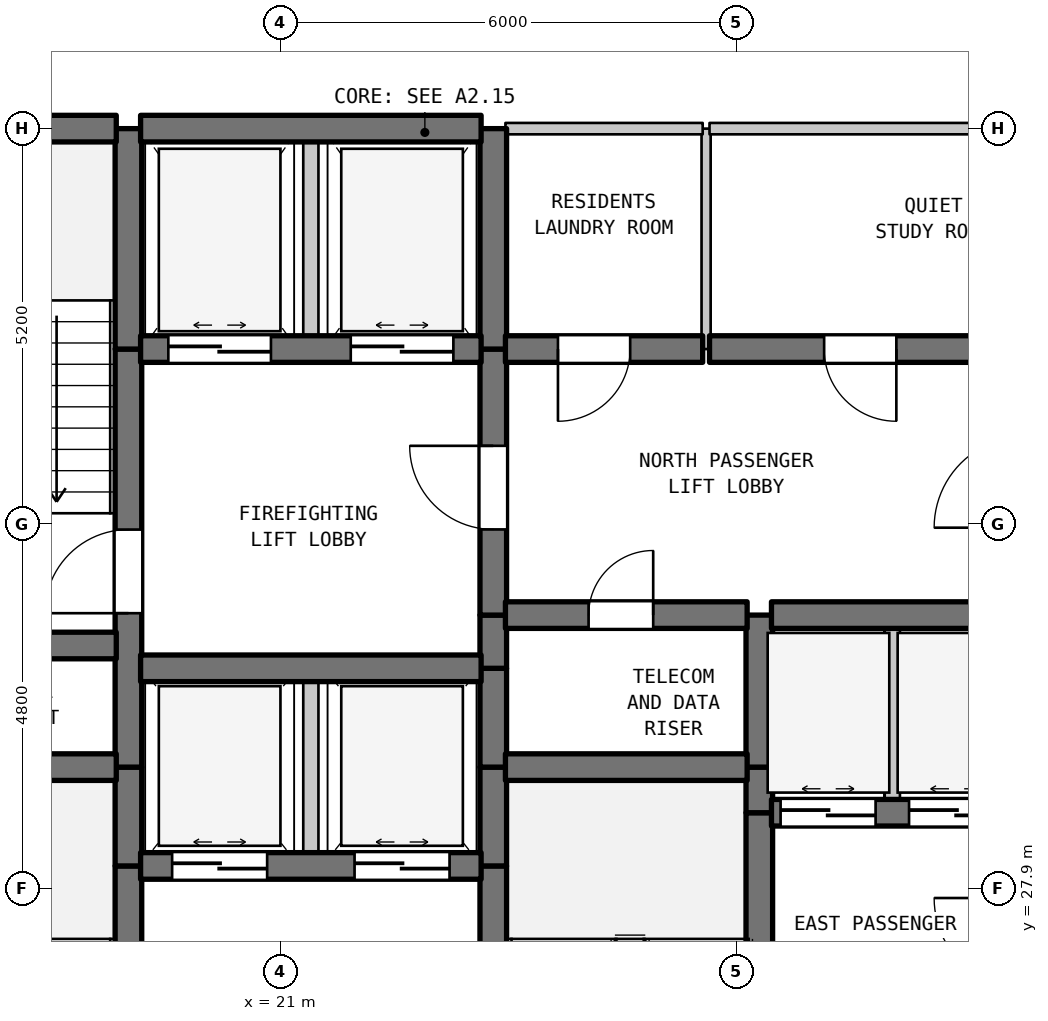
"""IFC4 building model, lengths in metres.
Left out: names, types, materials, properties, quantities, classifications, styles, units other than length and angle.
Written with IfcOpenShell. Run it as: python <this file> out.ifc"""

import sys

from ifc_helpers import new_model, si_unit, direction, frame, frame_2d, origin, place, context, subcontext, project, spatial, rectangle, extrude, element, fill, save


model = new_model("IFC4")
c1 = context("Model", 3, precision=1e-05, world=origin(), true_north=direction((0.0, 1.0)))
c2 = subcontext(c1, "Body", "Model", "MODEL_VIEW")
j1 = project(units=[si_unit("LENGTHUNIT", "METRE"), si_unit("PLANEANGLEUNIT", "RADIAN")], contexts=[c1])
p1 = place(None, origin())
s1 = spatial("IfcSite", under=j1, at=p1, CompositionType="ELEMENT")
p2 = place(p1, origin())
s2 = spatial("IfcBuilding", under=s1, at=p2, CompositionType="ELEMENT")
p3 = place(p2, frame((0.0, 0.0, 206.9)))
s3 = spatial("IfcBuildingStorey", under=s2, at=p3, CompositionType="ELEMENT", Elevation=206.9)
p4 = place(p3, frame((19.0, 22.7, 0.0), z_axis=(0.0, 0.0, 1.0), x_axis=(0.0, 1.0, 0.0)))
e1 = element("IfcWall", 1, at=p4, inside=s3, PredefinedType="SHEAR", context=c2, shape_type="SweptSolid", body=[
    extrude(rectangle(XDim=5.5, YDim=0.35, at=frame_2d((2.75, 0.0))), origin(), (0.0, 0.0, 1.0), 3.39),
])
p5 = place(p4, frame((0.631, 0.0, 0.0)))
e2 = element("IfcOpeningElement", 2, at=p5, cuts=e1, PredefinedType="OPENING", context=c2, shape_type="SweptSolid", body=[
    extrude(rectangle(XDim=1.1, YDim=2.15, at=frame_2d((0.55, 1.075))), frame((0.0, 0.185, 0.0), z_axis=(0.0, -1.0, 0.0), x_axis=(1.0, 0.0, 0.0)), (0.0, 0.0, 1.0), 0.37),
])
p6 = place(p3, frame((19.0, 28.2, 0.0), z_axis=(0.0, 0.0, 1.0), x_axis=(0.0, 1.0, 0.0)))
e3 = element("IfcWall", 3, at=p6, inside=s3, PredefinedType="SHEAR", context=c2, shape_type="SweptSolid", body=[
    extrude(rectangle(XDim=1.3, YDim=0.35, at=frame_2d((0.65, 0.0))), origin(), (0.0, 0.0, 1.0), 3.39),
])
p7 = place(p3, frame((19.0, 29.5, 0.0), z_axis=(0.0, 0.0, 1.0), x_axis=(0.0, 1.0, 0.0)))
e4 = element("IfcWall", 4, at=p7, inside=s3, PredefinedType="SHEAR", context=c2, shape_type="SweptSolid", body=[
    extrude(rectangle(XDim=5.5, YDim=0.35, at=frame_2d((2.75, 0.0))), origin(), (0.0, 0.0, 1.0), 3.39),
])
p8 = place(p7, frame((2.025, 0.0, 0.0)))
e5 = element("IfcOpeningElement", 5, at=p8, cuts=e4, PredefinedType="OPENING", context=c2, shape_type="SweptSolid", body=[
    extrude(rectangle(XDim=1.1, YDim=2.15, at=frame_2d((0.55, 1.075))), frame((0.0, 0.185, 0.0), z_axis=(0.0, -1.0, 0.0), x_axis=(1.0, 0.0, 0.0)), (0.0, 0.0, 1.0), 0.37),
])
p9 = place(p3, frame((19.0, 35.0, 0.0), z_axis=(0.0, 0.0, 1.0), x_axis=(0.0, 1.0, 0.0)))
e6 = element("IfcWall", 6, at=p9, inside=s3, PredefinedType="SHEAR", context=c2, shape_type="SweptSolid", body=[
    extrude(rectangle(XDim=2.9, YDim=0.35, at=frame_2d((1.45, 0.0))), origin(), (0.0, 0.0, 1.0), 3.39),
])
p10 = place(p3, frame((21.4, 28.2, 0.0), z_axis=(0.0, 0.0, 1.0), x_axis=(0.0, 1.0, 0.0)))
e7 = element("IfcWall", 7, at=p10, inside=s3, PredefinedType="STANDARD", context=c2, shape_type="SweptSolid", body=[
    extrude(rectangle(XDim=2.6, YDim=0.2, at=frame_2d((1.3, 0.0))), origin(), (0.0, 0.0, 1.0), 3.39),
])
p11 = place(p3, frame((21.4, 35.0, 0.0), z_axis=(0.0, 0.0, 1.0), x_axis=(0.0, 1.0, 0.0)))
e8 = element("IfcWall", 8, at=p11, inside=s3, PredefinedType="STANDARD", context=c2, shape_type="SweptSolid", body=[
    extrude(rectangle(XDim=2.9, YDim=0.2, at=frame_2d((1.45, 0.0))), origin(), (0.0, 0.0, 1.0), 3.39),
])
p12 = place(p3, frame((23.8, 22.7, 0.0), z_axis=(0.0, 0.0, 1.0), x_axis=(0.0, 1.0, 0.0)))
e9 = element("IfcWall", 9, at=p12, inside=s3, PredefinedType="SHEAR", context=c2, shape_type="SweptSolid", body=[
    extrude(rectangle(XDim=5.5, YDim=0.35, at=frame_2d((2.75, 0.0))), origin(), (0.0, 0.0, 1.0), 3.39),
])
p13 = place(p12, frame((0.235, 0.0, 0.0)))
e10 = element("IfcOpeningElement", 10, at=p13, cuts=e9, PredefinedType="OPENING", context=c2, shape_type="SweptSolid", body=[
    extrude(rectangle(XDim=1.1, YDim=2.15, at=frame_2d((0.55, 1.075))), frame((0.0, 0.185, 0.0), z_axis=(0.0, -1.0, 0.0), x_axis=(1.0, 0.0, 0.0)), (0.0, 0.0, 1.0), 0.37),
])
for number, where, z_axis, x_axis in (
    (11, (23.8, 28.2, 0.0), (0.0, 0.0, 1.0), (0.0, 1.0, 0.0)),
    (12, (23.8, 29.5, 0.0), (0.0, 0.0, 1.0), (0.0, 1.0, 0.0)),
):
    element("IfcWall", number, at=place(p3, frame(where, z_axis=z_axis, x_axis=x_axis)), inside=s3, PredefinedType="SHEAR", context=c2, shape_type="SweptSolid", body=[
        extrude(rectangle(XDim=1.3, YDim=0.35, at=frame_2d((0.65, 0.0))), origin(), (0.0, 0.0, 1.0), 3.39),
    ])
p14 = place(p3, frame((23.8, 30.8, 0.0), z_axis=(0.0, 0.0, 1.0), x_axis=(0.0, 1.0, 0.0)))
e13 = element("IfcWall", 13, at=p14, inside=s3, PredefinedType="SHEAR", context=c2, shape_type="SweptSolid", body=[
    extrude(rectangle(XDim=0.7, YDim=0.35, at=frame_2d((0.35, 0.0))), origin(), (0.0, 0.0, 1.0), 3.39),
])
p15 = place(p3, frame((23.8, 31.5, 0.0), z_axis=(0.0, 0.0, 1.0), x_axis=(0.0, 1.0, 0.0)))
e14 = element("IfcWall", 14, at=p15, inside=s3, PredefinedType="SHEAR", context=c2, shape_type="SweptSolid", body=[
    extrude(rectangle(XDim=3.5, YDim=0.35, at=frame_2d((1.75, 0.0))), origin(), (0.0, 0.0, 1.0), 3.39),
])
p16 = place(p15, frame((1.127, 0.0, 0.0)))
e15 = element("IfcOpeningElement", 15, at=p16, cuts=e14, PredefinedType="OPENING", context=c2, shape_type="SweptSolid", body=[
    extrude(rectangle(XDim=1.1, YDim=2.15, at=frame_2d((0.55, 1.075))), frame((0.0, 0.185, 0.0), z_axis=(0.0, -1.0, 0.0), x_axis=(1.0, 0.0, 0.0)), (0.0, 0.0, 1.0), 0.37),
])
p17 = place(p3, frame((23.8, 35.0, 0.0), z_axis=(0.0, 0.0, 1.0), x_axis=(0.0, 1.0, 0.0)))
e16 = element("IfcWall", 16, at=p17, inside=s3, PredefinedType="SHEAR", context=c2, shape_type="SweptSolid", body=[
    extrude(rectangle(XDim=2.9, YDim=0.35, at=frame_2d((1.45, 0.0))), origin(), (0.0, 0.0, 1.0), 3.39),
])
p18 = place(p3, frame((26.6, 35.0, 0.0), z_axis=(0.0, 0.0, 1.0), x_axis=(0.0, 1.0, 0.0)))
e17 = element("IfcWall", 17, at=p18, inside=s3, PredefinedType="PARTITIONING", context=c2, shape_type="SweptSolid", body=[
    extrude(rectangle(XDim=2.9, YDim=0.12, at=frame_2d((1.45, 0.0))), origin(), (0.0, 0.0, 1.0), 3.39),
])
p19 = place(p3, frame((27.3, 25.6, 0.0), z_axis=(0.0, 0.0, 1.0), x_axis=(0.0, 1.0, 0.0)))
e18 = element("IfcWall", 18, at=p19, inside=s3, PredefinedType="SHEAR", context=c2, shape_type="SweptSolid", body=[
    extrude(rectangle(XDim=3.3, YDim=0.35, at=frame_2d((1.65, 0.0))), origin(), (0.0, 0.0, 1.0), 3.39),
])
p20 = place(p3, frame((27.3, 28.9, 0.0), z_axis=(0.0, 0.0, 1.0), x_axis=(0.0, 1.0, 0.0)))
e19 = element("IfcWall", 19, at=p20, inside=s3, PredefinedType="SHEAR", context=c2, shape_type="SweptSolid", body=[
    extrude(rectangle(XDim=0.6, YDim=0.35, at=frame_2d((0.3, 0.0))), origin(), (0.0, 0.0, 1.0), 3.39),
])
p21 = place(p3, frame((27.3, 29.5, 0.0), z_axis=(0.0, 0.0, 1.0), x_axis=(0.0, 1.0, 0.0)))
e20 = element("IfcWall", 20, at=p21, inside=s3, PredefinedType="SHEAR", context=c2, shape_type="SweptSolid", body=[
    extrude(rectangle(XDim=2.0, YDim=0.35, at=frame_2d((1.0, 0.0))), origin(), (0.0, 0.0, 1.0), 3.39),
])
p22 = place(p3, frame((29.05, 28.9, 0.0), z_axis=(0.0, 0.0, 1.0), x_axis=(0.0, 1.0, 0.0)))
e21 = element("IfcWall", 21, at=p22, inside=s3, PredefinedType="STANDARD", context=c2, shape_type="SweptSolid", body=[
    extrude(rectangle(XDim=2.6, YDim=0.2, at=frame_2d((1.3, 0.0))), origin(), (0.0, 0.0, 1.0), 3.39),
])
p23 = place(p3, frame((19.16, 28.2, 0.0), z_axis=(0.0, 0.0, 1.0), x_axis=(1.0, 0.0, 0.0)))
e22 = element("IfcWall", 22, at=p23, inside=s3, PredefinedType="SHEAR", context=c2, shape_type="SweptSolid", body=[
    extrude(rectangle(XDim=4.48, YDim=0.35, at=frame_2d((2.24, 0.0))), origin(), (0.0, 0.0, 1.0), 3.39),
])
p24 = place(p23, frame((0.415, 0.0, 0.0)))
e23 = element("IfcOpeningElement", 23, at=p24, cuts=e22, PredefinedType="OPENING", context=c2, shape_type="SweptSolid", body=[
    extrude(rectangle(XDim=1.25, YDim=2.2, at=frame_2d((0.625, 1.1))), frame((0.0, 0.185, 0.0), z_axis=(0.0, -1.0, 0.0), x_axis=(1.0, 0.0, 0.0)), (0.0, 0.0, 1.0), 0.37),
])
p25 = place(p23, frame((2.815, 0.0, 0.0)))
e24 = element("IfcOpeningElement", 24, at=p25, cuts=e22, PredefinedType="OPENING", context=c2, shape_type="SweptSolid", body=[
    extrude(rectangle(XDim=1.25, YDim=2.2, at=frame_2d((0.625, 1.1))), frame((0.0, 0.185, 0.0), z_axis=(0.0, -1.0, 0.0), x_axis=(1.0, 0.0, 0.0)), (0.0, 0.0, 1.0), 0.37),
])
p26 = place(p3, frame((27.46, 28.9, 0.0), z_axis=(0.0, 0.0, 1.0), x_axis=(1.0, 0.0, 0.0)))
e25 = element("IfcWall", 25, at=p26, inside=s3, PredefinedType="SHEAR", context=c2, shape_type="SweptSolid", body=[
    extrude(rectangle(XDim=3.18, YDim=0.35, at=frame_2d((1.59, 0.0))), origin(), (0.0, 0.0, 1.0), 3.39),
])
p27 = place(p26, frame((0.12, 0.0, 0.0)))
e26 = element("IfcOpeningElement", 26, at=p27, cuts=e25, PredefinedType="OPENING", context=c2, shape_type="SweptSolid", body=[
    extrude(rectangle(XDim=1.25, YDim=2.2, at=frame_2d((0.625, 1.1))), frame((0.0, 0.185, 0.0), z_axis=(0.0, -1.0, 0.0), x_axis=(1.0, 0.0, 0.0)), (0.0, 0.0, 1.0), 0.37),
])
p28 = place(p26, frame((1.81, 0.0, 0.0)))
e27 = element("IfcOpeningElement", 27, at=p28, cuts=e25, PredefinedType="OPENING", context=c2, shape_type="SweptSolid", body=[
    extrude(rectangle(XDim=1.25, YDim=2.2, at=frame_2d((0.625, 1.1))), frame((0.0, 0.185, 0.0), z_axis=(0.0, -1.0, 0.0), x_axis=(1.0, 0.0, 0.0)), (0.0, 0.0, 1.0), 0.37),
])
p29 = place(p3, frame((15.16, 29.5, 0.0), z_axis=(0.0, 0.0, 1.0), x_axis=(1.0, 0.0, 0.0)))
e28 = element("IfcWall", 28, at=p29, inside=s3, PredefinedType="SHEAR", context=c2, shape_type="SweptSolid", body=[
    extrude(rectangle(XDim=3.68, YDim=0.35, at=frame_2d((1.84, 0.0))), origin(), (0.0, 0.0, 1.0), 3.39),
])
p30 = place(p3, frame((23.96, 29.5, 0.0), z_axis=(0.0, 0.0, 1.0), x_axis=(1.0, 0.0, 0.0)))
e29 = element("IfcWall", 29, at=p30, inside=s3, PredefinedType="SHEAR", context=c2, shape_type="SweptSolid", body=[
    extrude(rectangle(XDim=3.18, YDim=0.35, at=frame_2d((1.59, 0.0))), origin(), (0.0, 0.0, 1.0), 3.39),
])
p31 = place(p3, frame((19.16, 30.8, 0.0), z_axis=(0.0, 0.0, 1.0), x_axis=(1.0, 0.0, 0.0)))
e30 = element("IfcWall", 30, at=p31, inside=s3, PredefinedType="SHEAR", context=c2, shape_type="SweptSolid", body=[
    extrude(rectangle(XDim=4.48, YDim=0.35, at=frame_2d((2.24, 0.0))), origin(), (0.0, 0.0, 1.0), 3.39),
])
p32 = place(p3, frame((15.16, 31.1, 0.0), z_axis=(0.0, 0.0, 1.0), x_axis=(1.0, 0.0, 0.0)))
e31 = element("IfcWall", 31, at=p32, inside=s3, PredefinedType="SHEAR", context=c2, shape_type="SweptSolid", body=[
    extrude(rectangle(XDim=3.68, YDim=0.35, at=frame_2d((1.84, 0.0))), origin(), (0.0, 0.0, 1.0), 3.39),
])
p33 = place(p3, frame((23.96, 31.5, 0.0), z_axis=(0.0, 0.0, 1.0), x_axis=(1.0, 0.0, 0.0)))
e32 = element("IfcWall", 32, at=p33, inside=s3, PredefinedType="SHEAR", context=c2, shape_type="SweptSolid", body=[
    extrude(rectangle(XDim=3.18, YDim=0.35, at=frame_2d((1.59, 0.0))), origin(), (0.0, 0.0, 1.0), 3.39),
])
p34 = place(p33, frame((1.094, 0.0, 0.0)))
e33 = element("IfcOpeningElement", 33, at=p34, cuts=e32, PredefinedType="OPENING", context=c2, shape_type="SweptSolid", body=[
    extrude(rectangle(XDim=0.85, YDim=2.1, at=frame_2d((0.425, 1.05))), frame((0.0, 0.185, 0.0), z_axis=(0.0, -1.0, 0.0), x_axis=(1.0, 0.0, 0.0)), (0.0, 0.0, 1.0), 0.37),
])
p35 = place(p3, frame((27.46, 31.5, 0.0), z_axis=(0.0, 0.0, 1.0), x_axis=(1.0, 0.0, 0.0)))
e34 = element("IfcWall", 34, at=p35, inside=s3, PredefinedType="SHEAR", context=c2, shape_type="SweptSolid", body=[
    extrude(rectangle(XDim=3.18, YDim=0.35, at=frame_2d((1.59, 0.0))), origin(), (0.0, 0.0, 1.0), 3.39),
])
p36 = place(p3, frame((19.16, 35.0, 0.0), z_axis=(0.0, 0.0, 1.0), x_axis=(1.0, 0.0, 0.0)))
e35 = element("IfcWall", 35, at=p36, inside=s3, PredefinedType="SHEAR", context=c2, shape_type="SweptSolid", body=[
    extrude(rectangle(XDim=4.48, YDim=0.35, at=frame_2d((2.24, 0.0))), origin(), (0.0, 0.0, 1.0), 3.39),
])
p37 = place(p36, frame((0.365, 0.0, 0.0)))
e36 = element("IfcOpeningElement", 36, at=p37, cuts=e35, PredefinedType="OPENING", context=c2, shape_type="SweptSolid", body=[
    extrude(rectangle(XDim=1.35, YDim=2.2, at=frame_2d((0.675, 1.1))), frame((0.0, 0.185, 0.0), z_axis=(0.0, -1.0, 0.0), x_axis=(1.0, 0.0, 0.0)), (0.0, 0.0, 1.0), 0.37),
])
p38 = place(p36, frame((2.765, 0.0, 0.0)))
e37 = element("IfcOpeningElement", 37, at=p38, cuts=e35, PredefinedType="OPENING", context=c2, shape_type="SweptSolid", body=[
    extrude(rectangle(XDim=1.35, YDim=2.2, at=frame_2d((0.675, 1.1))), frame((0.0, 0.185, 0.0), z_axis=(0.0, -1.0, 0.0), x_axis=(1.0, 0.0, 0.0)), (0.0, 0.0, 1.0), 0.37),
])
p39 = place(p3, frame((23.96, 35.0, 0.0), z_axis=(0.0, 0.0, 1.0), x_axis=(1.0, 0.0, 0.0)))
e38 = element("IfcWall", 38, at=p39, inside=s3, PredefinedType="SHEAR", context=c2, shape_type="SweptSolid", body=[
    extrude(rectangle(XDim=2.595, YDim=0.35, at=frame_2d((1.297, 0.0))), origin(), (0.0, 0.0, 1.0), 3.39),
])
p40 = place(p39, frame((0.691, 0.0, 0.0)))
e39 = element("IfcOpeningElement", 39, at=p40, cuts=e38, PredefinedType="OPENING", context=c2, shape_type="SweptSolid", body=[
    extrude(rectangle(XDim=0.95, YDim=2.15, at=frame_2d((0.475, 1.075))), frame((0.0, 0.185, 0.0), z_axis=(0.0, -1.0, 0.0), x_axis=(1.0, 0.0, 0.0)), (0.0, 0.0, 1.0), 0.37),
])
p41 = place(p3, frame((26.645, 35.0, 0.0), z_axis=(0.0, 0.0, 1.0), x_axis=(1.0, 0.0, 0.0)))
e40 = element("IfcWall", 40, at=p41, inside=s3, PredefinedType="SHEAR", context=c2, shape_type="SweptSolid", body=[
    extrude(rectangle(XDim=3.995, YDim=0.35, at=frame_2d((1.998, 0.0))), origin(), (0.0, 0.0, 1.0), 3.39),
])
p42 = place(p41, frame((1.508, 0.0, 0.0)))
e41 = element("IfcOpeningElement", 41, at=p42, cuts=e40, PredefinedType="OPENING", context=c2, shape_type="SweptSolid", body=[
    extrude(rectangle(XDim=0.95, YDim=2.15, at=frame_2d((0.475, 1.075))), frame((0.0, 0.185, 0.0), z_axis=(0.0, -1.0, 0.0), x_axis=(1.0, 0.0, 0.0)), (0.0, 0.0, 1.0), 0.37),
])
p43 = place(p3, frame((15.16, 37.9, 0.0), z_axis=(0.0, 0.0, 1.0), x_axis=(1.0, 0.0, 0.0)))
e42 = element("IfcWall", 42, at=p43, inside=s3, PredefinedType="SHEAR", context=c2, shape_type="SweptSolid", body=[
    extrude(rectangle(XDim=3.68, YDim=0.35, at=frame_2d((1.84, 0.0))), origin(), (0.0, 0.0, 1.0), 3.39),
])
p44 = place(p3, frame((19.16, 37.9, 0.0), z_axis=(0.0, 0.0, 1.0), x_axis=(1.0, 0.0, 0.0)))
e43 = element("IfcWall", 43, at=p44, inside=s3, PredefinedType="SHEAR", context=c2, shape_type="SweptSolid", body=[
    extrude(rectangle(XDim=4.48, YDim=0.35, at=frame_2d((2.24, 0.0))), origin(), (0.0, 0.0, 1.0), 3.39),
])
p45 = place(p3, frame((23.96, 37.9, 0.0), z_axis=(0.0, 0.0, 1.0), x_axis=(1.0, 0.0, 0.0)))
e44 = element("IfcWall", 44, at=p45, inside=s3, PredefinedType="STANDARD", context=c2, shape_type="SweptSolid", body=[
    extrude(rectangle(XDim=2.595, YDim=0.15, at=frame_2d((1.297, 0.0))), origin(), (0.0, 0.0, 1.0), 2.89),
])
p46 = place(p3, frame((26.645, 37.9, 0.0), z_axis=(0.0, 0.0, 1.0), x_axis=(1.0, 0.0, 0.0)))
e45 = element("IfcWall", 45, at=p46, inside=s3, PredefinedType="STANDARD", context=c2, shape_type="SweptSolid", body=[
    extrude(rectangle(XDim=4.095, YDim=0.15, at=frame_2d((2.047, 0.0))), origin(), (0.0, 0.0, 1.0), 2.89),
])
p47 = place(p8, origin())
e46 = element("IfcDoor", 46, at=p47, inside=s3, OperationType="SINGLE_SWING_LEFT", PredefinedType="DOOR", context=c2, shape_type="SweptSolid", body=[
    extrude(rectangle(XDim=1.1, YDim=2.15, at=frame_2d((0.55, 1.075))), frame((0.0, 0.025, 0.0), z_axis=(0.0, -1.0, 0.0), x_axis=(1.0, 0.0, 0.0)), (0.0, 0.0, 1.0), 0.05),
])
fill(e5, e46)
p48 = place(p16, origin())
e47 = element("IfcDoor", 47, at=p48, inside=s3, OperationType="SINGLE_SWING_RIGHT", PredefinedType="DOOR", context=c2, shape_type="SweptSolid", body=[
    extrude(rectangle(XDim=1.1, YDim=2.15, at=frame_2d((0.55, 1.075))), frame((0.0, 0.025, 0.0), z_axis=(0.0, -1.0, 0.0), x_axis=(1.0, 0.0, 0.0)), (0.0, 0.0, 1.0), 0.05),
])
fill(e15, e47)
p49 = place(p24, origin())
e48 = element("IfcDoor", 48, at=p49, inside=s3, OperationType="DOUBLE_DOOR_SLIDING", PredefinedType="DOOR", context=c2, shape_type="SweptSolid", body=[
    extrude(rectangle(XDim=1.25, YDim=2.2, at=frame_2d((0.625, 1.1))), frame((0.0, 0.025, 0.0), z_axis=(0.0, -1.0, 0.0), x_axis=(1.0, 0.0, 0.0)), (0.0, 0.0, 1.0), 0.05),
])
fill(e23, e48)
p50 = place(p25, origin())
e49 = element("IfcDoor", 49, at=p50, inside=s3, OperationType="DOUBLE_DOOR_SLIDING", PredefinedType="DOOR", context=c2, shape_type="SweptSolid", body=[
    extrude(rectangle(XDim=1.25, YDim=2.2, at=frame_2d((0.625, 1.1))), frame((0.0, 0.025, 0.0), z_axis=(0.0, -1.0, 0.0), x_axis=(1.0, 0.0, 0.0)), (0.0, 0.0, 1.0), 0.05),
])
fill(e24, e49)
p51 = place(p27, origin())
e50 = element("IfcDoor", 50, at=p51, inside=s3, OperationType="DOUBLE_DOOR_SLIDING", PredefinedType="DOOR", context=c2, shape_type="SweptSolid", body=[
    extrude(rectangle(XDim=1.25, YDim=2.2, at=frame_2d((0.625, 1.1))), frame((0.0, 0.025, 0.0), z_axis=(0.0, -1.0, 0.0), x_axis=(1.0, 0.0, 0.0)), (0.0, 0.0, 1.0), 0.05),
])
fill(e26, e50)
p52 = place(p28, origin())
e51 = element("IfcDoor", 51, at=p52, inside=s3, OperationType="DOUBLE_DOOR_SLIDING", PredefinedType="DOOR", context=c2, shape_type="SweptSolid", body=[
    extrude(rectangle(XDim=1.25, YDim=2.2, at=frame_2d((0.625, 1.1))), frame((0.0, 0.025, 0.0), z_axis=(0.0, -1.0, 0.0), x_axis=(1.0, 0.0, 0.0)), (0.0, 0.0, 1.0), 0.05),
])
fill(e27, e51)
p53 = place(p34, origin())
e52 = element("IfcDoor", 52, at=p53, inside=s3, OperationType="SINGLE_SWING_RIGHT", PredefinedType="DOOR", context=c2, shape_type="SweptSolid", body=[
    extrude(rectangle(XDim=0.85, YDim=2.1, at=frame_2d((0.425, 1.05))), frame((0.0, 0.025, 0.0), z_axis=(0.0, -1.0, 0.0), x_axis=(1.0, 0.0, 0.0)), (0.0, 0.0, 1.0), 0.05),
])
fill(e33, e52)
p54 = place(p37, origin())
e53 = element("IfcDoor", 53, at=p54, inside=s3, OperationType="DOUBLE_DOOR_SLIDING", PredefinedType="DOOR", context=c2, shape_type="SweptSolid", body=[
    extrude(rectangle(XDim=1.35, YDim=2.2, at=frame_2d((0.675, 1.1))), frame((0.0, 0.025, 0.0), z_axis=(0.0, -1.0, 0.0), x_axis=(1.0, 0.0, 0.0)), (0.0, 0.0, 1.0), 0.05),
])
fill(e36, e53)
p55 = place(p38, origin())
e54 = element("IfcDoor", 54, at=p55, inside=s3, OperationType="DOUBLE_DOOR_SLIDING", PredefinedType="DOOR", context=c2, shape_type="SweptSolid", body=[
    extrude(rectangle(XDim=1.35, YDim=2.2, at=frame_2d((0.675, 1.1))), frame((0.0, 0.025, 0.0), z_axis=(0.0, -1.0, 0.0), x_axis=(1.0, 0.0, 0.0)), (0.0, 0.0, 1.0), 0.05),
])
fill(e37, e54)
p56 = place(p40, frame((0.95, 0.0, 0.0), z_axis=(0.0, 0.0, 1.0), x_axis=(-1.0, 0.0, 0.0)))
e55 = element("IfcDoor", 55, at=p56, inside=s3, OperationType="SINGLE_SWING_LEFT", PredefinedType="DOOR", context=c2, shape_type="SweptSolid", body=[
    extrude(rectangle(XDim=0.95, YDim=2.15, at=frame_2d((0.475, 1.075))), frame((0.0, 0.025, 0.0), z_axis=(0.0, -1.0, 0.0), x_axis=(1.0, 0.0, 0.0)), (0.0, 0.0, 1.0), 0.05),
])
fill(e39, e55)
p57 = place(p42, frame((0.95, 0.0, 0.0), z_axis=(0.0, 0.0, 1.0), x_axis=(-1.0, 0.0, 0.0)))
e56 = element("IfcDoor", 56, at=p57, inside=s3, OperationType="SINGLE_SWING_RIGHT", PredefinedType="DOOR", context=c2, shape_type="SweptSolid", body=[
    extrude(rectangle(XDim=0.95, YDim=2.15, at=frame_2d((0.475, 1.075))), frame((0.0, 0.025, 0.0), z_axis=(0.0, -1.0, 0.0), x_axis=(1.0, 0.0, 0.0)), (0.0, 0.0, 1.0), 0.05),
])
fill(e41, e56)
save(model, sys.argv[1])
